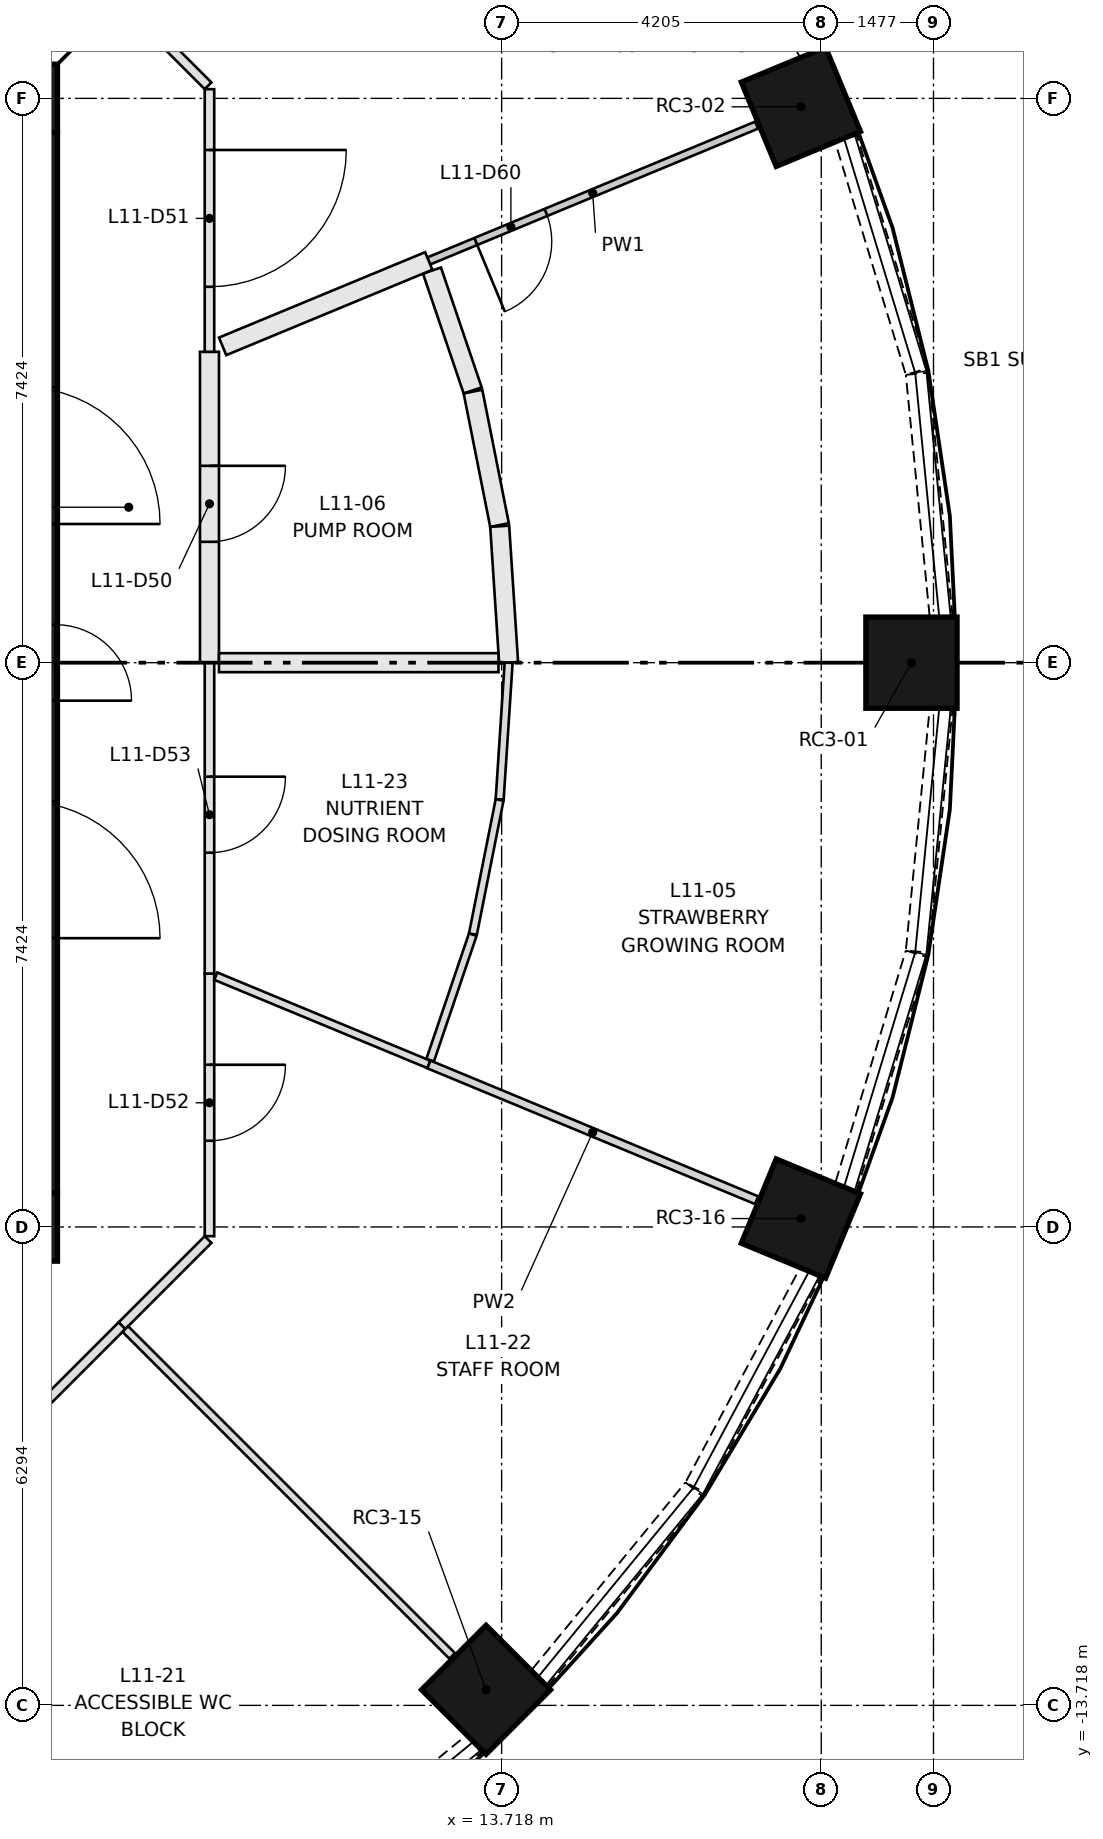
"""IFC4 building model, lengths in metres.
Left out: names, types, materials, properties, quantities, classifications, styles, units other than length and angle.
Written with IfcOpenShell. Run it as: python <this file> out.ifc"""

import sys

from ifc_helpers import new_model, si_unit, direction, frame, frame_2d, origin, origin_2d, place, context, subcontext, project, spatial, rectangle, extrude, element, fill, save


model = new_model("IFC4")
c1 = context("Model", 3, precision=1e-05, world=origin(), true_north=direction((0.0, 1.0)))
c2 = subcontext(c1, "Body", "Model", "MODEL_VIEW")
j1 = project(units=[si_unit("LENGTHUNIT", "METRE"), si_unit("PLANEANGLEUNIT", "RADIAN")], contexts=[c1])
p1 = place(None, origin())
s1 = spatial("IfcSite", under=j1, at=p1, CompositionType="ELEMENT")
p2 = place(p1, origin())
s2 = spatial("IfcBuilding", under=s1, at=p2, CompositionType="ELEMENT")
p3 = place(p2, frame((0.0, 0.0, 44.45)))
s3 = spatial("IfcBuildingStorey", under=s2, at=p3, CompositionType="ELEMENT", Elevation=44.45)
for number, where, z_axis, x_axis in (
    (1, (19.11, 0.0, 0.0), (0.0, 0.0, 1.0), (1.0, 0.0, 0.0)),
    (2, (17.655, 7.313, 0.0), (0.0, 0.0, 1.0), (0.924, 0.383, 0.0)),
    (3, (13.513, -13.513, 0.0), (0.0, 0.0, 1.0), (0.707, -0.707, 0.0)),
    (4, (17.655, -7.313, 0.0), (0.0, 0.0, 1.0), (0.924, -0.383, 0.0)),
):
    element("IfcColumn", number, at=place(p3, frame(where, z_axis=z_axis, x_axis=x_axis)), inside=s3, PredefinedType="COLUMN", context=c2, shape_type="SweptSolid", body=[
        extrude(rectangle(XDim=1.2, YDim=1.2, at=origin_2d()), origin(), (0.0, 0.0, 1.0), 3.65),
    ])
for number, where, z_axis, x_axis in (
    (5, (-7.874, -7.424, 0.0), (0.0, 0.0, 1.0), (1.0, 0.0, 0.0)),
    (6, (-7.874, 7.424, 0.0), (0.0, 0.0, 1.0), (1.0, 0.0, 0.0)),
):
    element("IfcWall", number, at=place(p3, frame(where, z_axis=z_axis, x_axis=x_axis)), inside=s3, PredefinedType="SHEAR", context=c2, shape_type="SweptSolid", body=[
        extrude(rectangle(XDim=15.748, YDim=0.9, at=frame_2d((7.874, 0.0))), origin(), (0.0, 0.0, 1.0), 3.65),
    ])
p4 = place(p3, frame((7.424, -6.974, 0.0), z_axis=(0.0, 0.0, 1.0), x_axis=(0.0, 1.0, 0.0)))
e7 = element("IfcWall", 7, at=p4, inside=s3, PredefinedType="SHEAR", context=c2, shape_type="SweptSolid", body=[
    extrude(rectangle(XDim=13.948, YDim=0.9, at=frame_2d((6.974, 0.0))), origin(), (0.0, 0.0, 1.0), 3.65),
])
p5 = place(p4, frame((6.474, 0.0, 0.0)))
e8 = element("IfcOpeningElement", 8, at=p5, cuts=e7, PredefinedType="OPENING", context=c2, shape_type="SweptSolid", body=[
    extrude(rectangle(XDim=1.0, YDim=2.1, at=frame_2d((0.5, 1.05))), frame((0.0, 0.46, 0.0), z_axis=(0.0, -1.0, 0.0), x_axis=(1.0, 0.0, 0.0)), (0.0, 0.0, 1.0), 0.92),
])
p6 = place(p4, frame((3.35, 0.0, 0.0)))
e9 = element("IfcOpeningElement", 9, at=p6, cuts=e7, PredefinedType="OPENING", context=c2, shape_type="SweptSolid", body=[
    extrude(rectangle(XDim=1.8, YDim=2.1, at=frame_2d((0.9, 1.05))), frame((0.0, 0.46, 0.0), z_axis=(0.0, -1.0, 0.0), x_axis=(1.0, 0.0, 0.0)), (0.0, 0.0, 1.0), 0.92),
])
p7 = place(p4, frame((8.799, 0.0, 0.0)))
e10 = element("IfcOpeningElement", 10, at=p7, cuts=e7, PredefinedType="OPENING", context=c2, shape_type="SweptSolid", body=[
    extrude(rectangle(XDim=1.8, YDim=2.1, at=frame_2d((0.9, 1.05))), frame((0.0, 0.46, 0.0), z_axis=(0.0, -1.0, 0.0), x_axis=(1.0, 0.0, 0.0)), (0.0, 0.0, 1.0), 0.92),
])
p8 = place(p3, frame((19.5, 0.613, 0.0), z_axis=(0.0, 0.0, 1.0), x_axis=(-0.098002102993, 0.995186207606, 0.0)))
e11 = element("IfcWall", 11, at=p8, inside=s3, PredefinedType="SOLIDWALL", context=c2, shape_type="SweptSolid", body=[
    extrude(rectangle(XDim=3.204, YDim=0.3, at=frame_2d((1.602, 0.0))), origin(), (0.0, 0.0, 1.0), 0.9),
])
p9 = place(p3, frame((19.18, 3.83, 0.0), z_axis=(0.0, 0.0, 1.0), x_axis=(-0.290472877795, 0.956883225512, 0.0)))
e12 = element("IfcWall", 12, at=p9, inside=s3, PredefinedType="SOLIDWALL", context=c2, shape_type="SweptSolid", body=[
    extrude(rectangle(XDim=3.202, YDim=0.3, at=frame_2d((1.601, 0.0))), origin(), (0.0, 0.0, 1.0), 0.9),
])
p10 = place(p3, frame((17.78, 8.028, 0.0), z_axis=(0.0, 0.0, 1.0), x_axis=(-0.471284265614, 0.881981372243, 0.0)))
e13 = element("IfcWall", 13, at=p10, inside=s3, PredefinedType="SOLIDWALL", context=c2, shape_type="SweptSolid", body=[
    extrude(rectangle(XDim=3.204, YDim=0.3, at=frame_2d((1.602, 0.0))), origin(), (0.0, 0.0, 1.0), 0.9),
])
for number, where, z_axis, x_axis in (
    (14, (10.879, -16.253, 0.0), (0.0, 0.0, 1.0), (0.773, 0.634, 0.0)),
    (15, (14.222, -13.354, 0.0), (0.0, 0.0, 1.0), (0.634, 0.773, 0.0)),
):
    element("IfcWall", number, at=place(p3, frame(where, z_axis=z_axis, x_axis=x_axis)), inside=s3, PredefinedType="SOLIDWALL", context=c2, shape_type="SweptSolid", body=[
        extrude(rectangle(XDim=3.202, YDim=0.3, at=frame_2d((1.601, 0.0))), origin(), (0.0, 0.0, 1.0), 0.9),
    ])
p11 = place(p3, frame((16.27, -10.854, 0.0), z_axis=(0.0, 0.0, 1.0), x_axis=(0.471284265614, 0.881981372243, 0.0)))
e16 = element("IfcWall", 16, at=p11, inside=s3, PredefinedType="SOLIDWALL", context=c2, shape_type="SweptSolid", body=[
    extrude(rectangle(XDim=3.204, YDim=0.3, at=frame_2d((1.602, 0.0))), origin(), (0.0, 0.0, 1.0), 0.9),
])
p12 = place(p3, frame((18.25, -6.895, 0.0), z_axis=(0.0, 0.0, 1.0), x_axis=(0.290472877795, 0.956883225512, 0.0)))
e17 = element("IfcWall", 17, at=p12, inside=s3, PredefinedType="SOLIDWALL", context=c2, shape_type="SweptSolid", body=[
    extrude(rectangle(XDim=3.202, YDim=0.3, at=frame_2d((1.601, 0.0))), origin(), (0.0, 0.0, 1.0), 0.9),
])
p13 = place(p3, frame((19.186, -3.801, 0.0), z_axis=(0.0, 0.0, 1.0), x_axis=(0.098002102993, 0.995186207606, 0.0)))
e18 = element("IfcWall", 18, at=p13, inside=s3, PredefinedType="SOLIDWALL", context=c2, shape_type="SweptSolid", body=[
    extrude(rectangle(XDim=3.204, YDim=0.3, at=frame_2d((1.602, 0.0))), origin(), (0.0, 0.0, 1.0), 0.9),
])
p14 = place(p3, frame((9.874, 4.09, 0.0), z_axis=(0.0, 0.0, 1.0), x_axis=(0.0, -1.0, 0.0)))
e19 = element("IfcWall", 19, at=p14, inside=s3, PredefinedType="PARTITIONING", context=c2, shape_type="SweptSolid", body=[
    extrude(rectangle(XDim=4.09, YDim=0.25, at=frame_2d((2.045, 0.0))), origin(), (0.0, 0.0, 1.0), 3.3),
])
p15 = place(p14, frame((1.5, 0.0, 0.0)))
e20 = element("IfcOpeningElement", 20, at=p15, cuts=e19, PredefinedType="OPENING", context=c2, shape_type="SweptSolid", body=[
    extrude(rectangle(XDim=1.0, YDim=2.1, at=frame_2d((0.5, 1.05))), frame((0.0, 0.135, 0.0), z_axis=(0.0, -1.0, 0.0), x_axis=(1.0, 0.0, 0.0)), (0.0, 0.0, 1.0), 0.27),
])
p16 = place(p3, frame((8.722, 8.722, 0.0), z_axis=(0.0, 0.0, 1.0), x_axis=(0.70718294931, -0.707030604857, 0.0)))
e21 = element("IfcWall", 21, at=p16, inside=s3, PredefinedType="PARTITIONING", context=c2, shape_type="SweptSolid", body=[
    extrude(rectangle(XDim=1.603, YDim=0.125, at=frame_2d((0.801, 0.0))), origin(), (0.0, 0.0, 1.0), 3.3),
])
p17 = place(p3, frame((9.874, 7.545, 0.0), z_axis=(0.0, 0.0, 1.0), x_axis=(0.0, -1.0, 0.0)))
e22 = element("IfcWall", 22, at=p17, inside=s3, PredefinedType="PARTITIONING", context=c2, shape_type="SweptSolid", body=[
    extrude(rectangle(XDim=3.455, YDim=0.125, at=frame_2d((1.728, 0.0))), origin(), (0.0, 0.0, 1.0), 3.3),
])
p18 = place(p17, frame((0.8, 0.0, 0.0)))
e23 = element("IfcOpeningElement", 23, at=p18, cuts=e22, PredefinedType="OPENING", context=c2, shape_type="SweptSolid", body=[
    extrude(rectangle(XDim=1.8, YDim=2.1, at=frame_2d((0.9, 1.05))), frame((0.0, 0.073, 0.0), z_axis=(0.0, -1.0, 0.0), x_axis=(1.0, 0.0, 0.0)), (0.0, 0.0, 1.0), 0.145),
])
p19 = place(p3, frame((9.856, -7.589, 0.0), z_axis=(0.0, 0.0, 1.0), x_axis=(-0.70718294931, -0.707030604857, 0.0)))
e24 = element("IfcWall", 24, at=p19, inside=s3, PredefinedType="PARTITIONING", context=c2, shape_type="SweptSolid", body=[
    extrude(rectangle(XDim=1.603, YDim=0.125, at=frame_2d((0.801, 0.0))), origin(), (0.0, 0.0, 1.0), 3.3),
])
p20 = place(p3, frame((9.874, -4.09, 0.0), z_axis=(0.0, 0.0, 1.0), x_axis=(0.0, -1.0, 0.0)))
e25 = element("IfcWall", 25, at=p20, inside=s3, PredefinedType="PARTITIONING", context=c2, shape_type="SweptSolid", body=[
    extrude(rectangle(XDim=3.455, YDim=0.125, at=frame_2d((1.728, 0.0))), origin(), (0.0, 0.0, 1.0), 3.3),
])
p21 = place(p20, frame((1.2, 0.0, 0.0)))
e26 = element("IfcOpeningElement", 26, at=p21, cuts=e25, PredefinedType="OPENING", context=c2, shape_type="SweptSolid", body=[
    extrude(rectangle(XDim=1.0, YDim=2.1, at=frame_2d((0.5, 1.05))), frame((0.0, 0.073, 0.0), z_axis=(0.0, -1.0, 0.0), x_axis=(1.0, 0.0, 0.0)), (0.0, 0.0, 1.0), 0.145),
])
p22 = place(p3, frame((9.874, 0.0, 0.0), z_axis=(0.0, 0.0, 1.0), x_axis=(0.0, -1.0, 0.0)))
e27 = element("IfcWall", 27, at=p22, inside=s3, PredefinedType="PARTITIONING", context=c2, shape_type="SweptSolid", body=[
    extrude(rectangle(XDim=4.09, YDim=0.125, at=frame_2d((2.045, 0.0))), origin(), (0.0, 0.0, 1.0), 3.3),
])
p23 = place(p22, frame((1.5, 0.0, 0.0)))
e28 = element("IfcOpeningElement", 28, at=p23, cuts=e27, PredefinedType="OPENING", context=c2, shape_type="SweptSolid", body=[
    extrude(rectangle(XDim=1.0, YDim=2.1, at=frame_2d((0.5, 1.05))), frame((0.0, 0.073, 0.0), z_axis=(0.0, -1.0, 0.0), x_axis=(1.0, 0.0, 0.0)), (0.0, 0.0, 1.0), 0.145),
])
p24 = place(p3, frame((8.722, -8.722, 0.0), z_axis=(0.0, 0.0, 1.0), x_axis=(-0.707030604857, -0.70718294931, 0.0)))
e29 = element("IfcWall", 29, at=p24, inside=s3, PredefinedType="PARTITIONING", context=c2, shape_type="SweptSolid", body=[
    extrude(rectangle(XDim=1.603, YDim=0.125, at=frame_2d((0.801, 0.0))), origin(), (0.0, 0.0, 1.0), 3.3),
])
p25 = place(p3, frame((13.337, 3.582, 0.0), z_axis=(0.0, 0.0, 1.0), x_axis=(-0.321458381335, 0.946923708157, 0.0)))
e30 = element("IfcWall", 30, at=p25, inside=s3, PredefinedType="PARTITIONING", context=c2, shape_type="SweptSolid", body=[
    extrude(rectangle(XDim=1.665, YDim=0.25, at=frame_2d((0.833, 0.0))), origin(), (0.0, 0.0, 1.0), 3.3),
])
p26 = place(p3, frame((13.69, 1.811, 0.0), z_axis=(0.0, 0.0, 1.0), x_axis=(-0.195014530736, 0.980800353182, 0.0)))
e31 = element("IfcWall", 31, at=p26, inside=s3, PredefinedType="PARTITIONING", context=c2, shape_type="SweptSolid", body=[
    extrude(rectangle(XDim=1.79, YDim=0.25, at=frame_2d((0.895, 0.0))), origin(), (0.0, 0.0, 1.0), 3.3),
])
p27 = place(p3, frame((13.81, 0.0, 0.0), z_axis=(0.0, 0.0, 1.0), x_axis=(-0.065437674742, 0.997856658406, 0.0)))
e32 = element("IfcWall", 32, at=p27, inside=s3, PredefinedType="PARTITIONING", context=c2, shape_type="SweptSolid", body=[
    extrude(rectangle(XDim=1.798, YDim=0.25, at=frame_2d((0.899, 0.0))), origin(), (0.0, 0.0, 1.0), 3.3),
])
p28 = place(p3, frame((17.073, 7.072, 0.0), z_axis=(0.0, 0.0, 1.0), x_axis=(-0.92387920118, -0.382684232268, 0.0)))
e33 = element("IfcWall", 33, at=p28, inside=s3, PredefinedType="PARTITIONING", context=c2, shape_type="SweptSolid", body=[
    extrude(rectangle(XDim=4.67, YDim=0.1, at=frame_2d((2.335, 0.0))), origin(), (0.0, 0.0, 1.0), 3.3),
])
p29 = place(p28, frame((3.0, 0.0, 0.0)))
e34 = element("IfcOpeningElement", 34, at=p29, cuts=e33, PredefinedType="OPENING", context=c2, shape_type="SweptSolid", body=[
    extrude(rectangle(XDim=1.0, YDim=2.1, at=frame_2d((0.5, 1.05))), frame((0.0, 0.06, 0.0), z_axis=(0.0, -1.0, 0.0), x_axis=(1.0, 0.0, 0.0)), (0.0, 0.0, 1.0), 0.12),
])
p30 = place(p3, frame((17.073, -7.072, 0.0), z_axis=(0.0, 0.0, 1.0), x_axis=(-0.92387920118, 0.382684232268, 0.0)))
e35 = element("IfcWall", 35, at=p30, inside=s3, PredefinedType="PARTITIONING", context=c2, shape_type="SweptSolid", body=[
    extrude(rectangle(XDim=4.67, YDim=0.11, at=frame_2d((2.335, 0.0))), origin(), (0.0, 0.0, 1.0), 3.3),
])
p31 = place(p3, frame((12.778, -5.229, 0.0), z_axis=(0.0, 0.0, 1.0), x_axis=(0.321513757885, 0.946904907311, 0.0)))
e36 = element("IfcWall", 36, at=p31, inside=s3, PredefinedType="PARTITIONING", context=c2, shape_type="SweptSolid", body=[
    extrude(rectangle(XDim=1.744, YDim=0.105, at=frame_2d((0.872, 0.0))), origin(), (0.0, 0.0, 1.0), 3.3),
])
p32 = place(p3, frame((13.34, -3.571, 0.0), z_axis=(0.0, 0.0, 1.0), x_axis=(0.195098478373, 0.980783657968, 0.0)))
e37 = element("IfcWall", 37, at=p32, inside=s3, PredefinedType="PARTITIONING", context=c2, shape_type="SweptSolid", body=[
    extrude(rectangle(XDim=1.8, YDim=0.105, at=frame_2d((0.9, 0.0))), origin(), (0.0, 0.0, 1.0), 3.3),
])
p33 = place(p3, frame((13.692, -1.799, 0.0), z_axis=(0.0, 0.0, 1.0), x_axis=(0.065395671101, 0.997859412042, 0.0)))
e38 = element("IfcWall", 38, at=p33, inside=s3, PredefinedType="PARTITIONING", context=c2, shape_type="SweptSolid", body=[
    extrude(rectangle(XDim=1.803, YDim=0.105, at=frame_2d((0.902, 0.0))), origin(), (0.0, 0.0, 1.0), 3.3),
])
p34 = place(p3, frame((10.047, 4.162, 0.0), z_axis=(0.0, 0.0, 1.0), x_axis=(0.92388200997, 0.382677451195, 0.0)))
e39 = element("IfcWall", 39, at=p34, inside=s3, PredefinedType="PARTITIONING", context=c2, shape_type="SweptSolid", body=[
    extrude(rectangle(XDim=2.935, YDim=0.25, at=frame_2d((1.468, 0.0))), origin(), (0.0, 0.0, 1.0), 3.3),
])
p35 = place(p3, frame((13.677, 0.0, 0.0), z_axis=(0.0, 0.0, 1.0), x_axis=(-1.0, 0.0, 0.0)))
e40 = element("IfcWall", 40, at=p35, inside=s3, PredefinedType="PARTITIONING", context=c2, shape_type="SweptSolid", body=[
    extrude(rectangle(XDim=3.677, YDim=0.25, at=frame_2d((1.839, 0.0))), origin(), (0.0, 0.0, 1.0), 3.3),
])
p36 = place(p3, frame((8.767, -8.767, 0.0), z_axis=(0.0, 0.0, 1.0), x_axis=(0.707106781187, -0.707106781187, 0.0)))
e41 = element("IfcWall", 41, at=p36, inside=s3, PredefinedType="PARTITIONING", context=c2, shape_type="SweptSolid", body=[
    extrude(rectangle(XDim=6.082, YDim=0.105, at=frame_2d((3.041, 0.0))), origin(), (0.0, 0.0, 1.0), 3.3),
])
p37 = place(p3, frame((9.957, -4.124, 0.0), z_axis=(0.0, 0.0, 1.0), x_axis=(0.923860842545, -0.382728550819, 0.0)))
e42 = element("IfcWall", 42, at=p37, inside=s3, PredefinedType="PARTITIONING", context=c2, shape_type="SweptSolid", body=[
    extrude(rectangle(XDim=3.033, YDim=0.105, at=frame_2d((1.517, 0.0))), origin(), (0.0, 0.0, 1.0), 3.3),
])
p38 = place(p5, frame((1.0, 0.0, 0.0), z_axis=(0.0, 0.0, 1.0), x_axis=(-1.0, 0.0, 0.0)))
e43 = element("IfcDoor", 43, at=p38, inside=s3, OperationType="SINGLE_SWING_LEFT", PredefinedType="DOOR", context=c2, shape_type="SweptSolid", body=[
    extrude(rectangle(XDim=1.0, YDim=2.1, at=frame_2d((0.5, 1.05))), frame((0.0, 0.45, 0.0), z_axis=(0.0, -1.0, 0.0), x_axis=(1.0, 0.0, 0.0)), (0.0, 0.0, 1.0), 0.05),
])
fill(e8, e43)
p39 = place(p15, origin())
e44 = element("IfcDoor", 44, at=p39, inside=s3, OperationType="SINGLE_SWING_LEFT", PredefinedType="DOOR", context=c2, shape_type="SweptSolid", body=[
    extrude(rectangle(XDim=1.0, YDim=2.1, at=frame_2d((0.5, 1.05))), frame((0.0, 0.025, 0.0), z_axis=(0.0, -1.0, 0.0), x_axis=(1.0, 0.0, 0.0)), (0.0, 0.0, 1.0), 0.05),
])
fill(e20, e44)
p40 = place(p18, origin())
e45 = element("IfcDoor", 45, at=p40, inside=s3, OperationType="DOUBLE_DOOR_SINGLE_SWING", PredefinedType="DOOR", context=c2, shape_type="SweptSolid", body=[
    extrude(rectangle(XDim=1.8, YDim=2.1, at=frame_2d((0.9, 1.05))), frame((0.0, 0.025, 0.0), z_axis=(0.0, -1.0, 0.0), x_axis=(1.0, 0.0, 0.0)), (0.0, 0.0, 1.0), 0.05),
])
fill(e23, e45)
p41 = place(p21, origin())
e46 = element("IfcDoor", 46, at=p41, inside=s3, OperationType="SINGLE_SWING_LEFT", PredefinedType="DOOR", context=c2, shape_type="SweptSolid", body=[
    extrude(rectangle(XDim=1.0, YDim=2.1, at=frame_2d((0.5, 1.05))), frame((0.0, 0.025, 0.0), z_axis=(0.0, -1.0, 0.0), x_axis=(1.0, 0.0, 0.0)), (0.0, 0.0, 1.0), 0.05),
])
fill(e26, e46)
p42 = place(p23, origin())
e47 = element("IfcDoor", 47, at=p42, inside=s3, OperationType="SINGLE_SWING_LEFT", PredefinedType="DOOR", context=c2, shape_type="SweptSolid", body=[
    extrude(rectangle(XDim=1.0, YDim=2.1, at=frame_2d((0.5, 1.05))), frame((0.0, 0.025, 0.0), z_axis=(0.0, -1.0, 0.0), x_axis=(1.0, 0.0, 0.0)), (0.0, 0.0, 1.0), 0.05),
])
fill(e28, e47)
p43 = place(p29, origin())
e48 = element("IfcDoor", 48, at=p43, inside=s3, OperationType="SINGLE_SWING_RIGHT", PredefinedType="DOOR", context=c2, shape_type="SweptSolid", body=[
    extrude(rectangle(XDim=1.0, YDim=2.1, at=frame_2d((0.5, 1.05))), frame((0.0, 0.025, 0.0), z_axis=(0.0, -1.0, 0.0), x_axis=(1.0, 0.0, 0.0)), (0.0, 0.0, 1.0), 0.05),
])
fill(e34, e48)
save(model, sys.argv[1])
